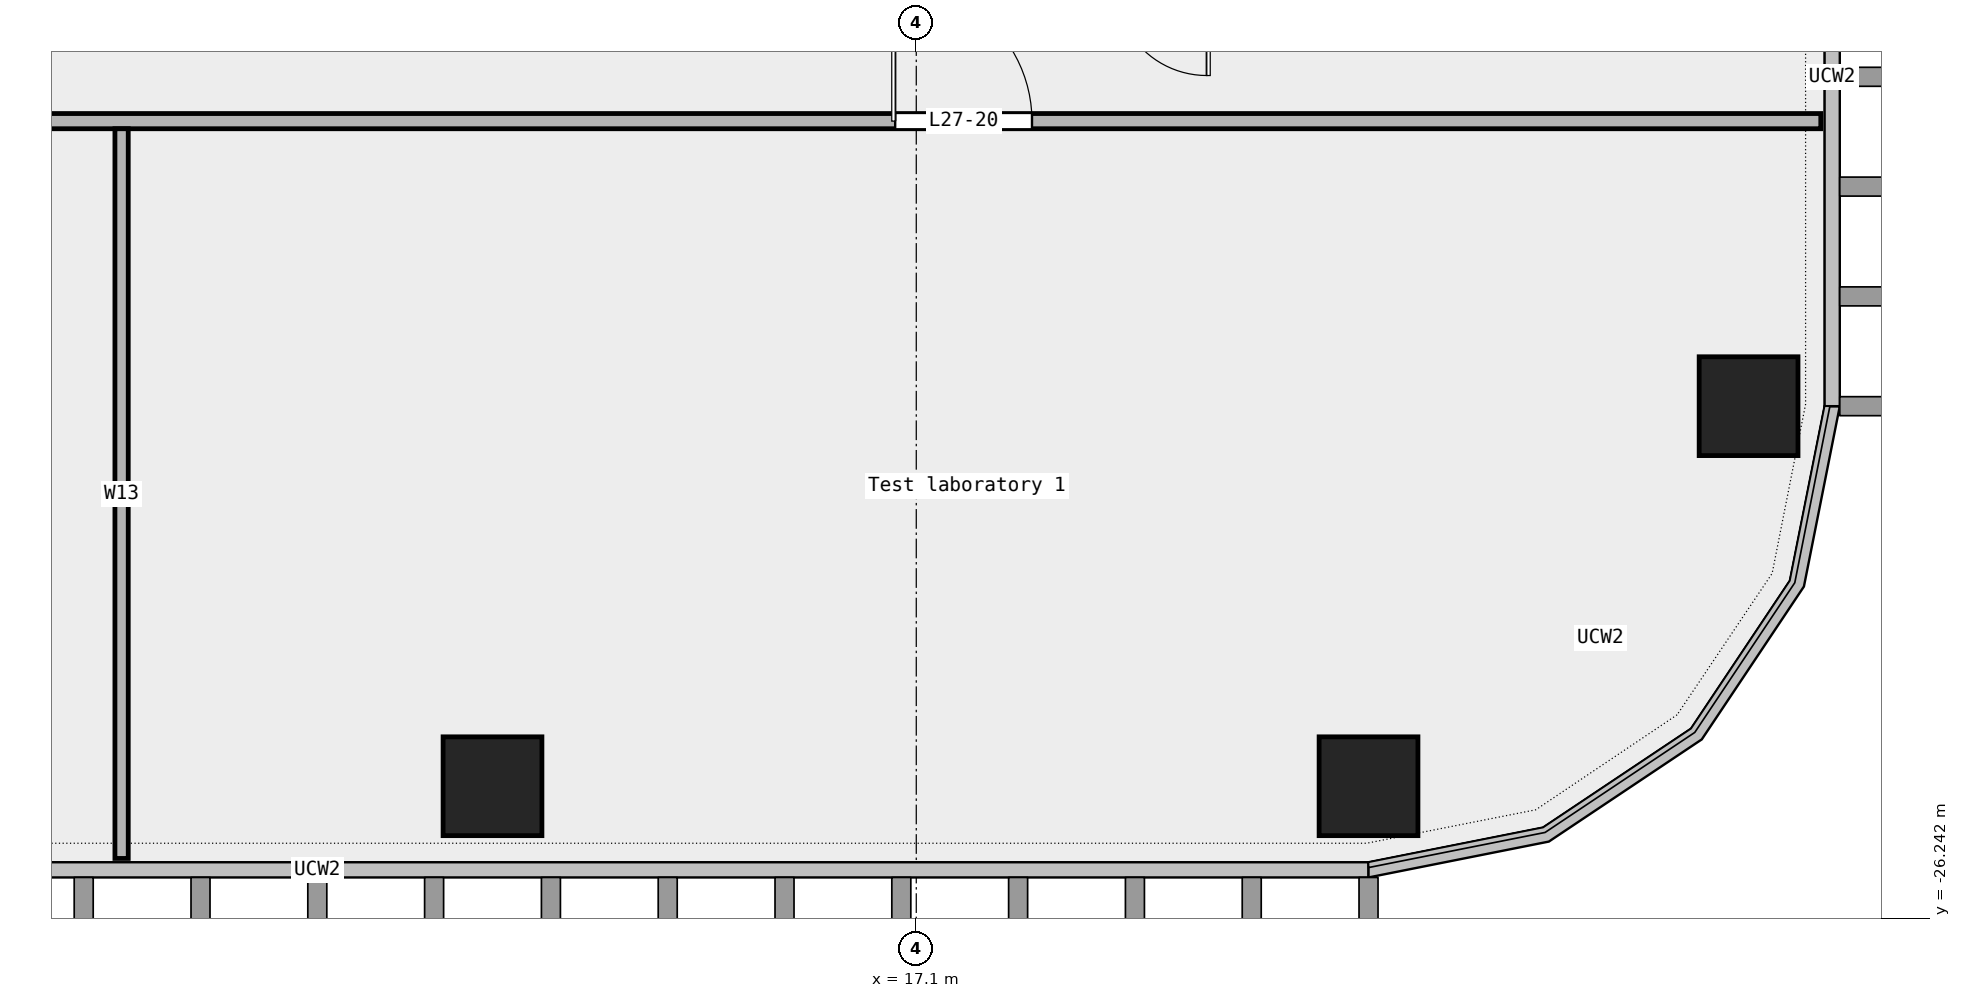
"""IFC4 building model, lengths in metres.
Left out: names, types, materials, properties, quantities, classifications, styles, units other than length and angle.
Written with IfcOpenShell. Run it as: python <this file> out.ifc"""

import sys

from ifc_helpers import new_model, si_unit, direction, frame, frame_2d, origin, origin_2d, place, context, subcontext, project, spatial, rectangle, extrude, element, fill, save


model = new_model("IFC4")
c1 = context("Model", 3, precision=1e-05, world=origin(), true_north=direction((0.0, 1.0)))
c2 = subcontext(c1, "Body", "Model", "MODEL_VIEW")
j1 = project(units=[si_unit("LENGTHUNIT", "METRE"), si_unit("PLANEANGLEUNIT", "RADIAN")], contexts=[c1])
p1 = place(None, origin())
s1 = spatial("IfcSite", under=j1, at=p1, CompositionType="ELEMENT")
p2 = place(p1, origin())
s2 = spatial("IfcBuilding", under=s1, at=p2, CompositionType="ELEMENT")
p3 = place(p2, frame((0.0, 0.0, 135.1)))
s3 = spatial("IfcBuildingStorey", under=s2, at=p3, CompositionType="ELEMENT", Elevation=135.1)
for number, where, z_axis, x_axis in (
    (1, (11.525, -24.5, 0.0), (0.0, 0.0, 1.0), (1.0, 0.0, 0.0)),
    (2, (23.05, -24.5, 0.0), (0.0, 0.0, 1.0), (1.0, 0.0, 0.0)),
    (3, (28.05, -19.5, 0.0), (0.0, 0.0, 1.0), (1.0, 0.0, 0.0)),
):
    element("IfcColumn", number, at=place(p3, frame(where, z_axis=z_axis, x_axis=x_axis)), inside=s3, PredefinedType="COLUMN", context=c2, shape_type="SweptSolid", body=[
        extrude(rectangle(XDim=1.3, YDim=1.3, at=origin_2d()), origin(), (0.0, 0.0, 1.0), 4.05),
    ])
p4 = place(p3, frame((-18.44, -15.75, 0.0), z_axis=(0.0, 0.0, 1.0), x_axis=(1.0, 0.0, 0.0)))
e4 = element("IfcWall", 4, at=p4, inside=s3, PredefinedType="PARTITIONING", context=c2, shape_type="SweptSolid", body=[
    extrude(rectangle(XDim=47.44, YDim=0.2, at=frame_2d((23.72, 0.0))), origin(), (0.0, 0.0, 1.0), 4.05),
])
p5 = place(p4, frame((18.708, 0.0, 0.0)))
e5 = element("IfcOpeningElement", 5, at=p5, cuts=e4, PredefinedType="OPENING", context=c2, shape_type="SweptSolid", body=[
    extrude(rectangle(XDim=1.5, YDim=2.1, at=frame_2d((0.75, 1.05))), frame((0.0, 0.112, 0.0), z_axis=(0.0, -1.0, 0.0), x_axis=(1.0, 0.0, 0.0)), (0.0, 0.0, 1.0), 0.224),
])
p6 = place(p4, frame((6.165, 0.0, 0.0)))
e6 = element("IfcOpeningElement", 6, at=p6, cuts=e4, PredefinedType="OPENING", context=c2, shape_type="SweptSolid", body=[
    extrude(rectangle(XDim=1.5, YDim=2.1, at=frame_2d((0.75, 1.05))), frame((0.0, 0.112, 0.0), z_axis=(0.0, -1.0, 0.0), x_axis=(1.0, 0.0, 0.0)), (0.0, 0.0, 1.0), 0.224),
])
p7 = place(p4, frame((35.262, 0.0, 0.0)))
e7 = element("IfcOpeningElement", 7, at=p7, cuts=e4, PredefinedType="OPENING", context=c2, shape_type="SweptSolid", body=[
    extrude(rectangle(XDim=1.8, YDim=2.1, at=frame_2d((0.9, 1.05))), frame((0.0, 0.112, 0.0), z_axis=(0.0, -1.0, 0.0), x_axis=(1.0, 0.0, 0.0)), (0.0, 0.0, 1.0), 0.224),
])
p8 = place(p3, frame((6.645, -25.45, 0.0), z_axis=(0.0, 0.0, 1.0), x_axis=(0.0, 1.0, 0.0)))
e8 = element("IfcWall", 8, at=p8, inside=s3, PredefinedType="PARTITIONING", context=c2, shape_type="SweptSolid", body=[
    extrude(rectangle(XDim=9.6, YDim=0.175, at=frame_2d((4.8, 0.0))), origin(), (0.0, 0.0, 1.0), 4.05),
])
p9 = place(p7, origin())
e9 = element("IfcDoor", 9, at=p9, inside=s3, OperationType="DOUBLE_DOOR_SINGLE_SWING", PredefinedType="DOOR", context=c2, shape_type="SweptSolid", body=[
    extrude(rectangle(XDim=1.8, YDim=2.1, at=frame_2d((0.9, 1.05))), frame((0.0, 0.025, 0.0), z_axis=(0.0, -1.0, 0.0), x_axis=(1.0, 0.0, 0.0)), (0.0, 0.0, 1.0), 0.05),
])
fill(e7, e9)
save(model, sys.argv[1])
